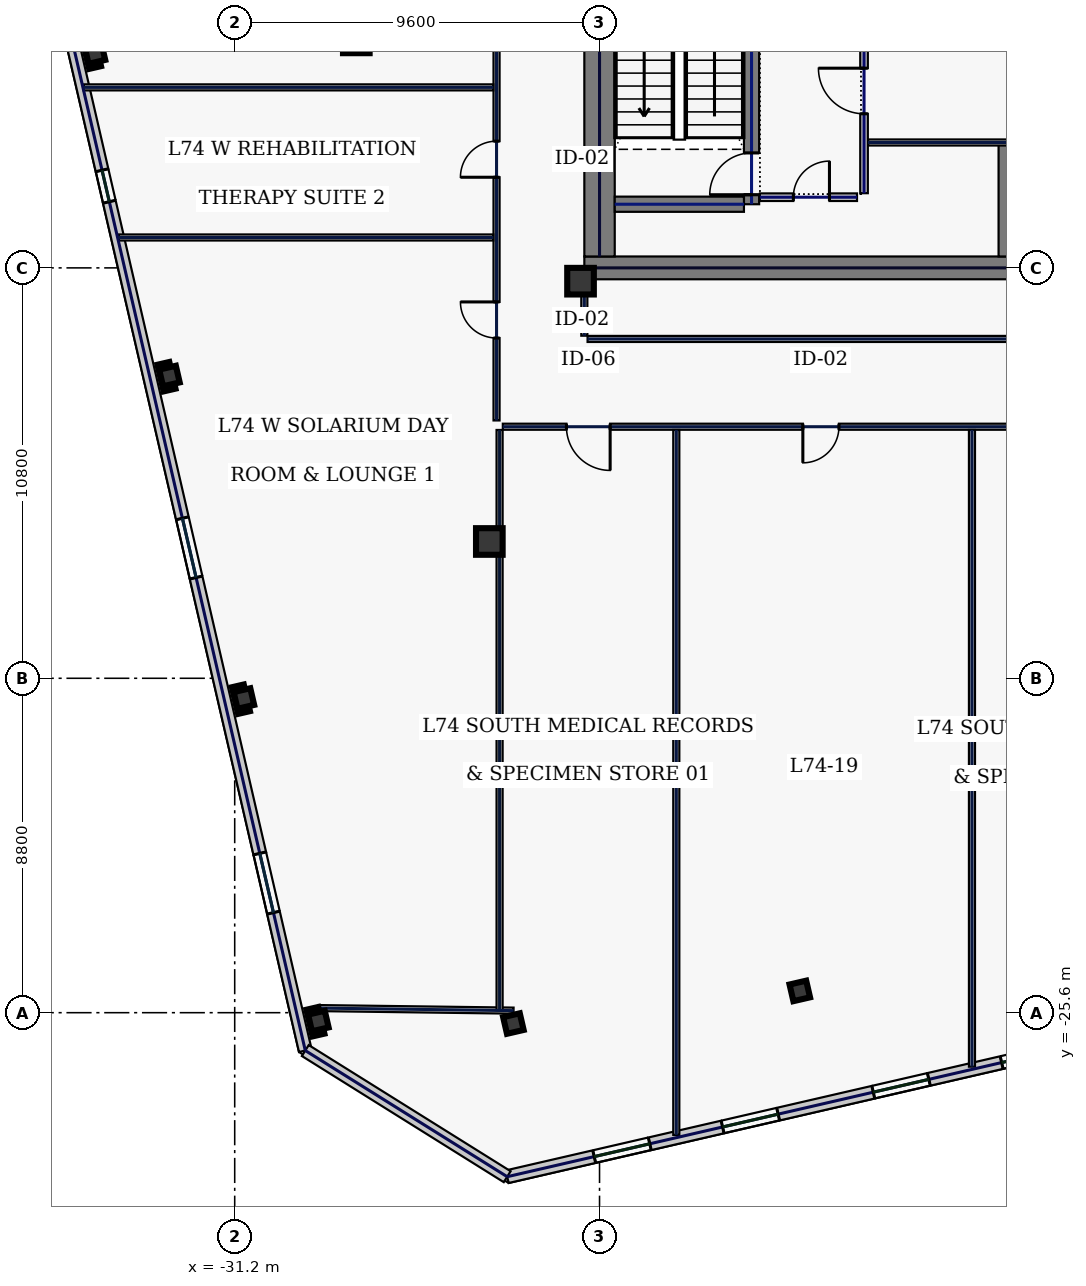
"""IFC4 building model, lengths in metres.
Left out: names, types, materials, properties, quantities, classifications, styles, units other than length and angle.
Written with IfcOpenShell. Run it as: python <this file> out.ifc"""

import sys

from ifc_helpers import new_model, si_unit, direction, frame, frame_2d, origin, origin_2d, place, context, subcontext, project, spatial, rectangle, hollow_rectangle, extrude, element, fill, save


model = new_model("IFC4")
c1 = context("Model", 3, precision=1e-05, world=origin(), true_north=direction((0.0, 1.0)))
c2 = subcontext(c1, "Body", "Model", "MODEL_VIEW")
j1 = project(units=[si_unit("LENGTHUNIT", "METRE"), si_unit("PLANEANGLEUNIT", "RADIAN")], contexts=[c1])
p1 = place(None, origin())
s1 = spatial("IfcSite", under=j1, at=p1, CompositionType="ELEMENT")
p2 = place(p1, origin())
s2 = spatial("IfcBuilding", under=s1, at=p2, CompositionType="ELEMENT")
p3 = place(p2, frame((0.0, 0.0, 317.0)))
s3 = spatial("IfcBuildingStorey", under=s2, at=p3, CompositionType="ELEMENT", Elevation=317.0)
p4 = place(p3, frame((-22.0, -6.0, 0.0), z_axis=(0.0, 0.0, 1.0), x_axis=(1.0, 0.0, 0.0)))
e1 = element("IfcWall", 1, at=p4, inside=s3, PredefinedType="SHEAR", context=c2, shape_type="SweptSolid", body=[
    extrude(rectangle(XDim=11.5, YDim=0.6, at=frame_2d((5.75, 0.0))), origin(), (0.0, 0.0, 1.0), 3.74),
])
p5 = place(p3, frame((-21.6, -5.7, 0.0), z_axis=(0.0, 0.0, 1.0), x_axis=(0.0, 1.0, 0.0)))
e2 = element("IfcWall", 2, at=p5, inside=s3, PredefinedType="SHEAR", context=c2, shape_type="SweptSolid", body=[
    extrude(rectangle(XDim=11.4, YDim=0.8, at=frame_2d((5.7, 0.0))), origin(), (0.0, 0.0, 1.0), 3.74),
])
p6 = place(p3, frame((-10.8, -5.7, 0.0), z_axis=(0.0, 0.0, 1.0), x_axis=(0.0, 1.0, 0.0)))
e3 = element("IfcWall", 3, at=p6, inside=s3, PredefinedType="SHEAR", context=c2, shape_type="SweptSolid", body=[
    extrude(rectangle(XDim=3.05, YDim=0.6, at=frame_2d((1.525, 0.0))), origin(), (0.0, 0.0, 1.0), 3.74),
])
p7 = place(p3, frame((-17.6, -4.325, 0.0), z_axis=(0.0, 0.0, 1.0), x_axis=(0.0, 1.0, 0.0)))
e4 = element("IfcWall", 4, at=p7, inside=s3, PredefinedType="SHEAR", context=c2, shape_type="SweptSolid", body=[
    extrude(rectangle(XDim=8.65, YDim=0.4, at=frame_2d((4.325, 0.0))), origin(), (0.0, 0.0, 1.0), 3.74),
])
p8 = place(p7, frame((0.25, 0.0, 0.0)))
e5 = element("IfcOpeningElement", 5, at=p8, cuts=e4, PredefinedType="OPENING", context=c2, shape_type="SweptSolid", body=[
    extrude(rectangle(XDim=1.1, YDim=2.2, at=frame_2d((0.55, 1.1))), frame((0.0, 0.21, 0.0), z_axis=(0.0, -1.0, 0.0), x_axis=(1.0, 0.0, 0.0)), (0.0, 0.0, 1.0), 0.42),
])
p9 = place(p3, frame((-21.2, -4.325, 0.0), z_axis=(0.0, 0.0, 1.0), x_axis=(1.0, 0.0, 0.0)))
e6 = element("IfcWall", 6, at=p9, inside=s3, PredefinedType="SHEAR", context=c2, shape_type="SweptSolid", body=[
    extrude(rectangle(XDim=3.4, YDim=0.4, at=frame_2d((1.7, 0.0))), origin(), (0.0, 0.0, 1.0), 3.74),
])
for number, where, z_axis, x_axis in (
    (7, (-22.1, -6.35, 0.0), (0.0, 0.0, 1.0), (1.0, 0.0, 0.0)),
    (8, (-24.5, -13.2, 0.0), (0.0, 0.0, 1.0), (1.0, 0.0, 0.0)),
    (9, (-28.0, 0.0, 0.0), (0.0, 0.0, 1.0), (1.0, 0.0, 0.0)),
):
    element("IfcColumn", number, at=place(p3, frame(where, z_axis=z_axis, x_axis=x_axis)), inside=s3, PredefinedType="COLUMN", context=c2, shape_type="SweptSolid", body=[
        extrude(hollow_rectangle(XDim=0.7, YDim=0.7, WallThickness=0.032, at=origin_2d()), origin(), (0.0, 0.0, 1.0), 3.74),
    ])
for number, where, z_axis, x_axis in (
    (10, (-23.867, -25.886, 0.0), (0.0, 0.0, 1.0), (0.974, 0.225, 0.0)),
    (11, (-16.33, -25.027, 0.0), (0.0, 0.0, 1.0), (0.974, 0.225, 0.0)),
    (12, (-34.877, -0.359, 0.0), (0.0, 0.0, 1.0), (0.974, 0.225, 0.0)),
    (13, (-32.917, -8.845, 0.0), (0.0, 0.0, 1.0), (0.974, 0.225, 0.0)),
    (14, (-30.958, -17.332, 0.0), (0.0, 0.0, 1.0), (0.974, 0.225, 0.0)),
    (15, (-28.999, -25.819, 0.0), (0.0, 0.0, 1.0), (0.974, 0.225, 0.0)),
):
    element("IfcColumn", number, at=place(p3, frame(where, z_axis=z_axis, x_axis=x_axis)), inside=s3, PredefinedType="COLUMN", context=c2, shape_type="SweptSolid", body=[
        extrude(hollow_rectangle(XDim=0.45, YDim=0.45, WallThickness=0.022, at=origin_2d()), origin(), (0.0, 0.0, 1.0), 3.74),
    ])
p10 = place(p3, frame((-24.03, -29.916, 0.0), z_axis=(0.0, 0.0, 1.0), x_axis=(0.974370978061, 0.224947098473, 0.0)))
e16 = element("IfcWall", 16, at=p10, inside=s3, PredefinedType="STANDARD", context=c2, shape_type="SweptSolid", body=[
    extrude(rectangle(XDim=17.506, YDim=0.34, at=frame_2d((8.753, 0.0))), origin(), (0.0, 0.0, 1.0), 3.74),
])
p11 = place(p10, frame((2.35, 0.0, 0.9)))
e17 = element("IfcOpeningElement", 17, at=p11, cuts=e16, PredefinedType="OPENING", context=c2, shape_type="SweptSolid", body=[
    extrude(rectangle(XDim=1.5, YDim=2.0, at=frame_2d((0.75, 1.0))), frame((0.0, 0.18, 0.0), z_axis=(0.0, -1.0, 0.0), x_axis=(1.0, 0.0, 0.0)), (0.0, 0.0, 1.0), 0.36),
])
p12 = place(p10, frame((5.817, 0.0, 0.9)))
e18 = element("IfcOpeningElement", 18, at=p12, cuts=e16, PredefinedType="OPENING", context=c2, shape_type="SweptSolid", body=[
    extrude(rectangle(XDim=1.5, YDim=2.0, at=frame_2d((0.75, 1.0))), frame((0.0, 0.18, 0.0), z_axis=(0.0, -1.0, 0.0), x_axis=(1.0, 0.0, 0.0)), (0.0, 0.0, 1.0), 0.36),
])
p13 = place(p10, frame((9.886, 0.0, 0.9)))
e19 = element("IfcOpeningElement", 19, at=p13, cuts=e16, PredefinedType="OPENING", context=c2, shape_type="SweptSolid", body=[
    extrude(rectangle(XDim=1.5, YDim=2.0, at=frame_2d((0.75, 1.0))), frame((0.0, 0.18, 0.0), z_axis=(0.0, -1.0, 0.0), x_axis=(1.0, 0.0, 0.0)), (0.0, 0.0, 1.0), 0.36),
])
p14 = place(p10, frame((13.353, 0.0, 0.9)))
e20 = element("IfcOpeningElement", 20, at=p14, cuts=e16, PredefinedType="OPENING", context=c2, shape_type="SweptSolid", body=[
    extrude(rectangle(XDim=1.5, YDim=2.0, at=frame_2d((0.75, 1.0))), frame((0.0, 0.18, 0.0), z_axis=(0.0, -1.0, 0.0), x_axis=(1.0, 0.0, 0.0)), (0.0, 0.0, 1.0), 0.36),
])
p15 = place(p3, frame((-37.486, 8.676, 0.0), z_axis=(0.0, 0.0, 1.0), x_axis=(0.224953091034, -0.974369594576, 0.0)))
e21 = element("IfcWall", 21, at=p15, inside=s3, PredefinedType="STANDARD", context=c2, shape_type="SweptSolid", body=[
    extrude(rectangle(XDim=36.2, YDim=0.34, at=frame_2d((18.1, 0.0))), origin(), (0.0, 0.0, 1.0), 3.74),
])
p16 = place(p15, frame((4.825, 0.0, 0.75)))
e22 = element("IfcOpeningElement", 22, at=p16, cuts=e21, PredefinedType="OPENING", context=c2, shape_type="SweptSolid", body=[
    extrude(rectangle(XDim=0.85, YDim=1.85, at=frame_2d((0.425, 0.925))), frame((0.0, 0.18, 0.0), z_axis=(0.0, -1.0, 0.0), x_axis=(1.0, 0.0, 0.0)), (0.0, 0.0, 1.0), 0.36),
])
p17 = place(p15, frame((12.425, 0.0, 0.75)))
e23 = element("IfcOpeningElement", 23, at=p17, cuts=e21, PredefinedType="OPENING", context=c2, shape_type="SweptSolid", body=[
    extrude(rectangle(XDim=0.85, YDim=1.85, at=frame_2d((0.425, 0.925))), frame((0.0, 0.18, 0.0), z_axis=(0.0, -1.0, 0.0), x_axis=(1.0, 0.0, 0.0)), (0.0, 0.0, 1.0), 0.36),
])
p18 = place(p15, frame((21.825, 0.0, 0.58)))
e24 = element("IfcOpeningElement", 24, at=p18, cuts=e21, PredefinedType="OPENING", context=c2, shape_type="SweptSolid", body=[
    extrude(rectangle(XDim=1.6, YDim=2.3, at=frame_2d((0.8, 1.15))), frame((0.0, 0.18, 0.0), z_axis=(0.0, -1.0, 0.0), x_axis=(1.0, 0.0, 0.0)), (0.0, 0.0, 1.0), 0.36),
])
p19 = place(p15, frame((30.875, 0.0, 0.58)))
e25 = element("IfcOpeningElement", 25, at=p19, cuts=e21, PredefinedType="OPENING", context=c2, shape_type="SweptSolid", body=[
    extrude(rectangle(XDim=1.6, YDim=2.3, at=frame_2d((0.8, 1.15))), frame((0.0, 0.18, 0.0), z_axis=(0.0, -1.0, 0.0), x_axis=(1.0, 0.0, 0.0)), (0.0, 0.0, 1.0), 0.36),
])
p20 = place(p3, frame((-29.343, -26.596, 0.0), z_axis=(0.0, 0.0, 1.0), x_axis=(0.848037708252, -0.529935887993, 0.0)))
e26 = element("IfcWall", 26, at=p20, inside=s3, PredefinedType="STANDARD", context=c2, shape_type="SweptSolid", body=[
    extrude(rectangle(XDim=6.265, YDim=0.34, at=frame_2d((3.133, 0.0))), origin(), (0.0, 0.0, 1.0), 3.74),
])
p21 = place(p3, frame((-17.38, -4.14, 0.0), z_axis=(0.0, 0.0, 1.0), x_axis=(1.0, 0.0, 0.0)))
e27 = element("IfcWall", 27, at=p21, inside=s3, PredefinedType="SOLIDWALL", context=c2, shape_type="SweptSolid", body=[
    extrude(rectangle(XDim=2.555, YDim=0.2, at=frame_2d((1.277, 0.0))), origin(), (0.0, 0.0, 1.0), 3.74),
])
p22 = place(p21, frame((0.88, 0.0, 0.0)))
e28 = element("IfcOpeningElement", 28, at=p22, cuts=e27, PredefinedType="OPENING", context=c2, shape_type="SweptSolid", body=[
    extrude(rectangle(XDim=0.95, YDim=2.2, at=frame_2d((0.475, 1.1))), frame((0.0, 0.11, 0.0), z_axis=(0.0, -1.0, 0.0), x_axis=(1.0, 0.0, 0.0)), (0.0, 0.0, 1.0), 0.22),
])
p23 = place(p3, frame((-14.535, -2.7, 0.0), z_axis=(0.0, 0.0, 1.0), x_axis=(1.0, 0.0, 0.0)))
e29 = element("IfcWall", 29, at=p23, inside=s3, PredefinedType="PARTITIONING", context=c2, shape_type="SweptSolid", body=[
    extrude(rectangle(XDim=3.735, YDim=0.16, at=frame_2d((1.867, 0.0))), origin(), (0.0, 0.0, 1.0), 3.74),
])
p24 = place(p3, frame((-14.64, -4.035, 0.0), z_axis=(0.0, 0.0, 1.0), x_axis=(0.0, 1.0, 0.0)))
e30 = element("IfcWall", 30, at=p24, inside=s3, PredefinedType="SOLIDWALL", context=c2, shape_type="SweptSolid", body=[
    extrude(rectangle(XDim=4.075, YDim=0.2, at=frame_2d((2.038, 0.0))), origin(), (0.0, 0.0, 1.0), 3.74),
])
p25 = place(p24, frame((2.09, 0.0, 0.0)))
e31 = element("IfcOpeningElement", 31, at=p25, cuts=e30, PredefinedType="OPENING", context=c2, shape_type="SweptSolid", body=[
    extrude(rectangle(XDim=1.2, YDim=2.2, at=frame_2d((0.6, 1.1))), frame((0.0, 0.11, 0.0), z_axis=(0.0, -1.0, 0.0), x_axis=(1.0, 0.0, 0.0)), (0.0, 0.0, 1.0), 0.22),
])
p26 = place(p3, frame((-28.994, -25.479, 0.0), z_axis=(0.0, 0.0, 1.0), x_axis=(0.999915052546, -0.01303409726, 0.0)))
e32 = element("IfcWall", 32, at=p26, inside=s3, PredefinedType="PARTITIONING", context=c2, shape_type="SweptSolid", body=[
    extrude(rectangle(XDim=5.132, YDim=0.16, at=frame_2d((2.566, 0.0))), origin(), (0.0, 0.0, 1.0), 3.74),
])
p27 = place(p3, frame((-24.31, -10.015, 0.0), z_axis=(0.0, 0.0, 1.0), x_axis=(0.0, 1.0, 0.0)))
e33 = element("IfcWall", 33, at=p27, inside=s3, PredefinedType="PARTITIONING", context=c2, shape_type="SweptSolid", body=[
    extrude(rectangle(XDim=20.13, YDim=0.16, at=frame_2d((10.065, 0.0))), origin(), (0.0, 0.0, 1.0), 3.74),
])
p28 = place(p27, frame((2.169, 0.0, 0.0)))
e34 = element("IfcOpeningElement", 34, at=p28, cuts=e33, PredefinedType="OPENING", context=c2, shape_type="SweptSolid", body=[
    extrude(rectangle(XDim=0.95, YDim=2.2, at=frame_2d((0.475, 1.1))), frame((0.0, 0.09, 0.0), z_axis=(0.0, -1.0, 0.0), x_axis=(1.0, 0.0, 0.0)), (0.0, 0.0, 1.0), 0.18),
])
p29 = place(p27, frame((6.4, 0.0, 0.0)))
e35 = element("IfcOpeningElement", 35, at=p29, cuts=e33, PredefinedType="OPENING", context=c2, shape_type="SweptSolid", body=[
    extrude(rectangle(XDim=0.95, YDim=2.2, at=frame_2d((0.475, 1.1))), frame((0.0, 0.09, 0.0), z_axis=(0.0, -1.0, 0.0), x_axis=(1.0, 0.0, 0.0)), (0.0, 0.0, 1.0), 0.18),
])
p30 = place(p27, frame((11.6, 0.0, 0.0)))
e36 = element("IfcOpeningElement", 36, at=p30, cuts=e33, PredefinedType="OPENING", context=c2, shape_type="SweptSolid", body=[
    extrude(rectangle(XDim=0.95, YDim=2.2, at=frame_2d((0.475, 1.1))), frame((0.0, 0.09, 0.0), z_axis=(0.0, -1.0, 0.0), x_axis=(1.0, 0.0, 0.0)), (0.0, 0.0, 1.0), 0.18),
])
p31 = place(p27, frame((17.131, 0.0, 0.0)))
e37 = element("IfcOpeningElement", 37, at=p31, cuts=e33, PredefinedType="OPENING", context=c2, shape_type="SweptSolid", body=[
    extrude(rectangle(XDim=0.95, YDim=2.2, at=frame_2d((0.475, 1.1))), frame((0.0, 0.09, 0.0), z_axis=(0.0, -1.0, 0.0), x_axis=(1.0, 0.0, 0.0)), (0.0, 0.0, 1.0), 0.18),
])
p32 = place(p3, frame((12.535, -10.18, 0.0), z_axis=(0.0, 0.0, 1.0), x_axis=(-1.0, 0.0, 0.0)))
e38 = element("IfcWall", 38, at=p32, inside=s3, PredefinedType="PARTITIONING", context=c2, shape_type="SweptSolid", body=[
    extrude(rectangle(XDim=36.68, YDim=0.16, at=frame_2d((18.34, 0.0))), origin(), (0.0, 0.0, 1.0), 3.74),
])
p33 = place(p32, frame((33.856, 0.0, 0.0)))
e39 = element("IfcOpeningElement", 39, at=p33, cuts=e38, PredefinedType="OPENING", context=c2, shape_type="SweptSolid", body=[
    extrude(rectangle(XDim=1.15, YDim=2.2, at=frame_2d((0.575, 1.1))), frame((0.0, 0.09, 0.0), z_axis=(0.0, -1.0, 0.0), x_axis=(1.0, 0.0, 0.0)), (0.0, 0.0, 1.0), 0.18),
])
p34 = place(p32, frame((27.835, 0.0, 0.0)))
e40 = element("IfcOpeningElement", 40, at=p34, cuts=e38, PredefinedType="OPENING", context=c2, shape_type="SweptSolid", body=[
    extrude(rectangle(XDim=0.95, YDim=2.2, at=frame_2d((0.475, 1.1))), frame((0.0, 0.09, 0.0), z_axis=(0.0, -1.0, 0.0), x_axis=(1.0, 0.0, 0.0)), (0.0, 0.0, 1.0), 0.18),
])
p35 = place(p32, frame((21.042, 0.0, 0.0)))
e41 = element("IfcOpeningElement", 41, at=p35, cuts=e38, PredefinedType="OPENING", context=c2, shape_type="SweptSolid", body=[
    extrude(rectangle(XDim=0.95, YDim=2.2, at=frame_2d((0.475, 1.1))), frame((0.0, 0.09, 0.0), z_axis=(0.0, -1.0, 0.0), x_axis=(1.0, 0.0, 0.0)), (0.0, 0.0, 1.0), 0.18),
])
p36 = place(p32, frame((15.688, 0.0, 0.0)))
e42 = element("IfcOpeningElement", 42, at=p36, cuts=e38, PredefinedType="OPENING", context=c2, shape_type="SweptSolid", body=[
    extrude(rectangle(XDim=0.95, YDim=2.2, at=frame_2d((0.475, 1.1))), frame((0.0, 0.09, 0.0), z_axis=(0.0, -1.0, 0.0), x_axis=(1.0, 0.0, 0.0)), (0.0, 0.0, 1.0), 0.18),
])
p37 = place(p32, frame((8.29, 0.0, 0.0)))
e43 = element("IfcOpeningElement", 43, at=p37, cuts=e38, PredefinedType="OPENING", context=c2, shape_type="SweptSolid", body=[
    extrude(rectangle(XDim=1.05, YDim=2.2, at=frame_2d((0.525, 1.1))), frame((0.0, 0.09, 0.0), z_axis=(0.0, -1.0, 0.0), x_axis=(1.0, 0.0, 0.0)), (0.0, 0.0, 1.0), 0.18),
])
p38 = place(p3, frame((-22.0, -6.42, 0.0), z_axis=(0.0, 0.0, 1.0), x_axis=(0.0, -1.0, 0.0)))
e44 = element("IfcWall", 44, at=p38, inside=s3, PredefinedType="PARTITIONING", context=c2, shape_type="SweptSolid", body=[
    extrude(rectangle(XDim=1.365, YDim=0.16, at=frame_2d((0.683, 0.0))), origin(), (0.0, 0.0, 1.0), 3.74),
])
p39 = place(p3, frame((-21.915, -7.87, 0.0), z_axis=(0.0, 0.0, 1.0), x_axis=(1.0, 0.0, 0.0)))
e45 = element("IfcWall", 45, at=p39, inside=s3, PredefinedType="PARTITIONING", context=c2, shape_type="SweptSolid", body=[
    extrude(rectangle(XDim=11.2, YDim=0.16, at=frame_2d((5.6, 0.0))), origin(), (0.0, 0.0, 1.0), 3.74),
])
p40 = place(p3, frame((-24.23, -25.536, 0.0), z_axis=(0.0, 0.0, 1.0), x_axis=(0.0, 1.0, 0.0)))
e46 = element("IfcWall", 46, at=p40, inside=s3, PredefinedType="PARTITIONING", context=c2, shape_type="SweptSolid", body=[
    extrude(rectangle(XDim=15.271, YDim=0.16, at=frame_2d((7.635, 0.0))), origin(), (0.0, 0.0, 1.0), 3.335),
])
p41 = place(p3, frame((-19.58, -28.817, 0.0), z_axis=(0.0, 0.0, 1.0), x_axis=(0.0, 1.0, 0.0)))
e47 = element("IfcWall", 47, at=p41, inside=s3, PredefinedType="PARTITIONING", context=c2, shape_type="SweptSolid", body=[
    extrude(rectangle(XDim=18.552, YDim=0.16, at=frame_2d((9.276, 0.0))), origin(), (0.0, 0.0, 1.0), 3.74),
])
p42 = place(p3, frame((-11.8, -27.021, 0.0), z_axis=(0.0, 0.0, 1.0), x_axis=(0.0, 1.0, 0.0)))
e48 = element("IfcWall", 48, at=p42, inside=s3, PredefinedType="PARTITIONING", context=c2, shape_type="SweptSolid", body=[
    extrude(rectangle(XDim=16.756, YDim=0.16, at=frame_2d((8.378, 0.0))), origin(), (0.0, 0.0, 1.0), 3.74),
])
p43 = place(p3, frame((-34.262, -5.2, 0.0), z_axis=(0.0, 0.0, 1.0), x_axis=(1.0, 0.0, 0.0)))
e49 = element("IfcWall", 49, at=p43, inside=s3, PredefinedType="PARTITIONING", context=c2, shape_type="SweptSolid", body=[
    extrude(rectangle(XDim=9.867, YDim=0.16, at=frame_2d((4.933, 0.0))), origin(), (0.0, 0.0, 1.0), 3.74),
])
p44 = place(p3, frame((-35.174, -1.25, 0.0), z_axis=(0.0, 0.0, 1.0), x_axis=(1.0, 0.0, 0.0)))
e50 = element("IfcWall", 50, at=p44, inside=s3, PredefinedType="PARTITIONING", context=c2, shape_type="SweptSolid", body=[
    extrude(rectangle(XDim=10.779, YDim=0.16, at=frame_2d((5.389, 0.0))), origin(), (0.0, 0.0, 1.0), 3.74),
])
p45 = place(p11, origin())
e51 = element("IfcWindow", 51, at=p45, inside=s3, PartitioningType="SINGLE_PANEL", PredefinedType="WINDOW", context=c2, shape_type="SweptSolid", body=[
    extrude(rectangle(XDim=1.5, YDim=2.0, at=frame_2d((0.75, 1.0))), frame((0.0, 0.03, 0.0), z_axis=(0.0, -1.0, 0.0), x_axis=(1.0, 0.0, 0.0)), (0.0, 0.0, 1.0), 0.06),
])
fill(e17, e51)
p46 = place(p12, origin())
e52 = element("IfcWindow", 52, at=p46, inside=s3, PartitioningType="SINGLE_PANEL", PredefinedType="WINDOW", context=c2, shape_type="SweptSolid", body=[
    extrude(rectangle(XDim=1.5, YDim=2.0, at=frame_2d((0.75, 1.0))), frame((0.0, 0.03, 0.0), z_axis=(0.0, -1.0, 0.0), x_axis=(1.0, 0.0, 0.0)), (0.0, 0.0, 1.0), 0.06),
])
fill(e18, e52)
p47 = place(p13, origin())
e53 = element("IfcWindow", 53, at=p47, inside=s3, PartitioningType="SINGLE_PANEL", PredefinedType="WINDOW", context=c2, shape_type="SweptSolid", body=[
    extrude(rectangle(XDim=1.5, YDim=2.0, at=frame_2d((0.75, 1.0))), frame((0.0, 0.03, 0.0), z_axis=(0.0, -1.0, 0.0), x_axis=(1.0, 0.0, 0.0)), (0.0, 0.0, 1.0), 0.06),
])
fill(e19, e53)
p48 = place(p14, origin())
e54 = element("IfcWindow", 54, at=p48, inside=s3, PartitioningType="SINGLE_PANEL", PredefinedType="WINDOW", context=c2, shape_type="SweptSolid", body=[
    extrude(rectangle(XDim=1.5, YDim=2.0, at=frame_2d((0.75, 1.0))), frame((0.0, 0.03, 0.0), z_axis=(0.0, -1.0, 0.0), x_axis=(1.0, 0.0, 0.0)), (0.0, 0.0, 1.0), 0.06),
])
fill(e20, e54)
p49 = place(p17, origin())
e55 = element("IfcWindow", 55, at=p49, inside=s3, PartitioningType="SINGLE_PANEL", PredefinedType="WINDOW", context=c2, shape_type="SweptSolid", body=[
    extrude(rectangle(XDim=0.85, YDim=1.85, at=frame_2d((0.425, 0.925))), frame((0.0, 0.03, 0.0), z_axis=(0.0, -1.0, 0.0), x_axis=(1.0, 0.0, 0.0)), (0.0, 0.0, 1.0), 0.06),
])
fill(e23, e55)
p50 = place(p18, origin())
e56 = element("IfcWindow", 56, at=p50, inside=s3, PartitioningType="SINGLE_PANEL", PredefinedType="WINDOW", context=c2, shape_type="SweptSolid", body=[
    extrude(rectangle(XDim=1.6, YDim=2.3, at=frame_2d((0.8, 1.15))), frame((0.0, 0.03, 0.0), z_axis=(0.0, -1.0, 0.0), x_axis=(1.0, 0.0, 0.0)), (0.0, 0.0, 1.0), 0.06),
])
fill(e24, e56)
p51 = place(p19, origin())
e57 = element("IfcWindow", 57, at=p51, inside=s3, PartitioningType="SINGLE_PANEL", PredefinedType="WINDOW", context=c2, shape_type="SweptSolid", body=[
    extrude(rectangle(XDim=1.6, YDim=2.3, at=frame_2d((0.8, 1.15))), frame((0.0, 0.03, 0.0), z_axis=(0.0, -1.0, 0.0), x_axis=(1.0, 0.0, 0.0)), (0.0, 0.0, 1.0), 0.06),
])
fill(e25, e57)
p52 = place(p8, origin())
e58 = element("IfcDoor", 58, at=p52, inside=s3, OperationType="SINGLE_SWING_LEFT", PredefinedType="DOOR", context=c2, shape_type="SweptSolid", body=[
    extrude(rectangle(XDim=1.1, YDim=2.2, at=frame_2d((0.55, 1.1))), frame((0.0, 0.025, 0.0), z_axis=(0.0, -1.0, 0.0), x_axis=(1.0, 0.0, 0.0)), (0.0, 0.0, 1.0), 0.05),
])
fill(e5, e58)
p53 = place(p22, origin())
e59 = element("IfcDoor", 59, at=p53, inside=s3, OperationType="SINGLE_SWING_RIGHT", PredefinedType="DOOR", context=c2, shape_type="SweptSolid", body=[
    extrude(rectangle(XDim=0.95, YDim=2.2, at=frame_2d((0.475, 1.1))), frame((0.0, 0.025, 0.0), z_axis=(0.0, -1.0, 0.0), x_axis=(1.0, 0.0, 0.0)), (0.0, 0.0, 1.0), 0.05),
])
fill(e28, e59)
p54 = place(p25, origin())
e60 = element("IfcDoor", 60, at=p54, inside=s3, OperationType="SINGLE_SWING_RIGHT", PredefinedType="DOOR", context=c2, shape_type="SweptSolid", body=[
    extrude(rectangle(XDim=1.2, YDim=2.2, at=frame_2d((0.6, 1.1))), frame((0.0, 0.025, 0.0), z_axis=(0.0, -1.0, 0.0), x_axis=(1.0, 0.0, 0.0)), (0.0, 0.0, 1.0), 0.05),
])
fill(e31, e60)
p55 = place(p33, origin())
e61 = element("IfcDoor", 61, at=p55, inside=s3, OperationType="SINGLE_SWING_LEFT", PredefinedType="DOOR", context=c2, shape_type="SweptSolid", body=[
    extrude(rectangle(XDim=1.15, YDim=2.2, at=frame_2d((0.575, 1.1))), frame((0.0, 0.025, 0.0), z_axis=(0.0, -1.0, 0.0), x_axis=(1.0, 0.0, 0.0)), (0.0, 0.0, 1.0), 0.05),
])
fill(e39, e61)
p56 = place(p34, origin())
e62 = element("IfcDoor", 62, at=p56, inside=s3, OperationType="SINGLE_SWING_RIGHT", PredefinedType="DOOR", context=c2, shape_type="SweptSolid", body=[
    extrude(rectangle(XDim=0.95, YDim=2.2, at=frame_2d((0.475, 1.1))), frame((0.0, 0.025, 0.0), z_axis=(0.0, -1.0, 0.0), x_axis=(1.0, 0.0, 0.0)), (0.0, 0.0, 1.0), 0.05),
])
fill(e40, e62)
p57 = place(p28, origin())
e63 = element("IfcDoor", 63, at=p57, inside=s3, OperationType="SINGLE_SWING_RIGHT", PredefinedType="DOOR", context=c2, shape_type="SweptSolid", body=[
    extrude(rectangle(XDim=0.95, YDim=2.2, at=frame_2d((0.475, 1.1))), frame((0.0, 0.025, 0.0), z_axis=(0.0, -1.0, 0.0), x_axis=(1.0, 0.0, 0.0)), (0.0, 0.0, 1.0), 0.05),
])
fill(e34, e63)
p58 = place(p29, origin())
e64 = element("IfcDoor", 64, at=p58, inside=s3, OperationType="SINGLE_SWING_LEFT", PredefinedType="DOOR", context=c2, shape_type="SweptSolid", body=[
    extrude(rectangle(XDim=0.95, YDim=2.2, at=frame_2d((0.475, 1.1))), frame((0.0, 0.025, 0.0), z_axis=(0.0, -1.0, 0.0), x_axis=(1.0, 0.0, 0.0)), (0.0, 0.0, 1.0), 0.05),
])
fill(e35, e64)
save(model, sys.argv[1])
